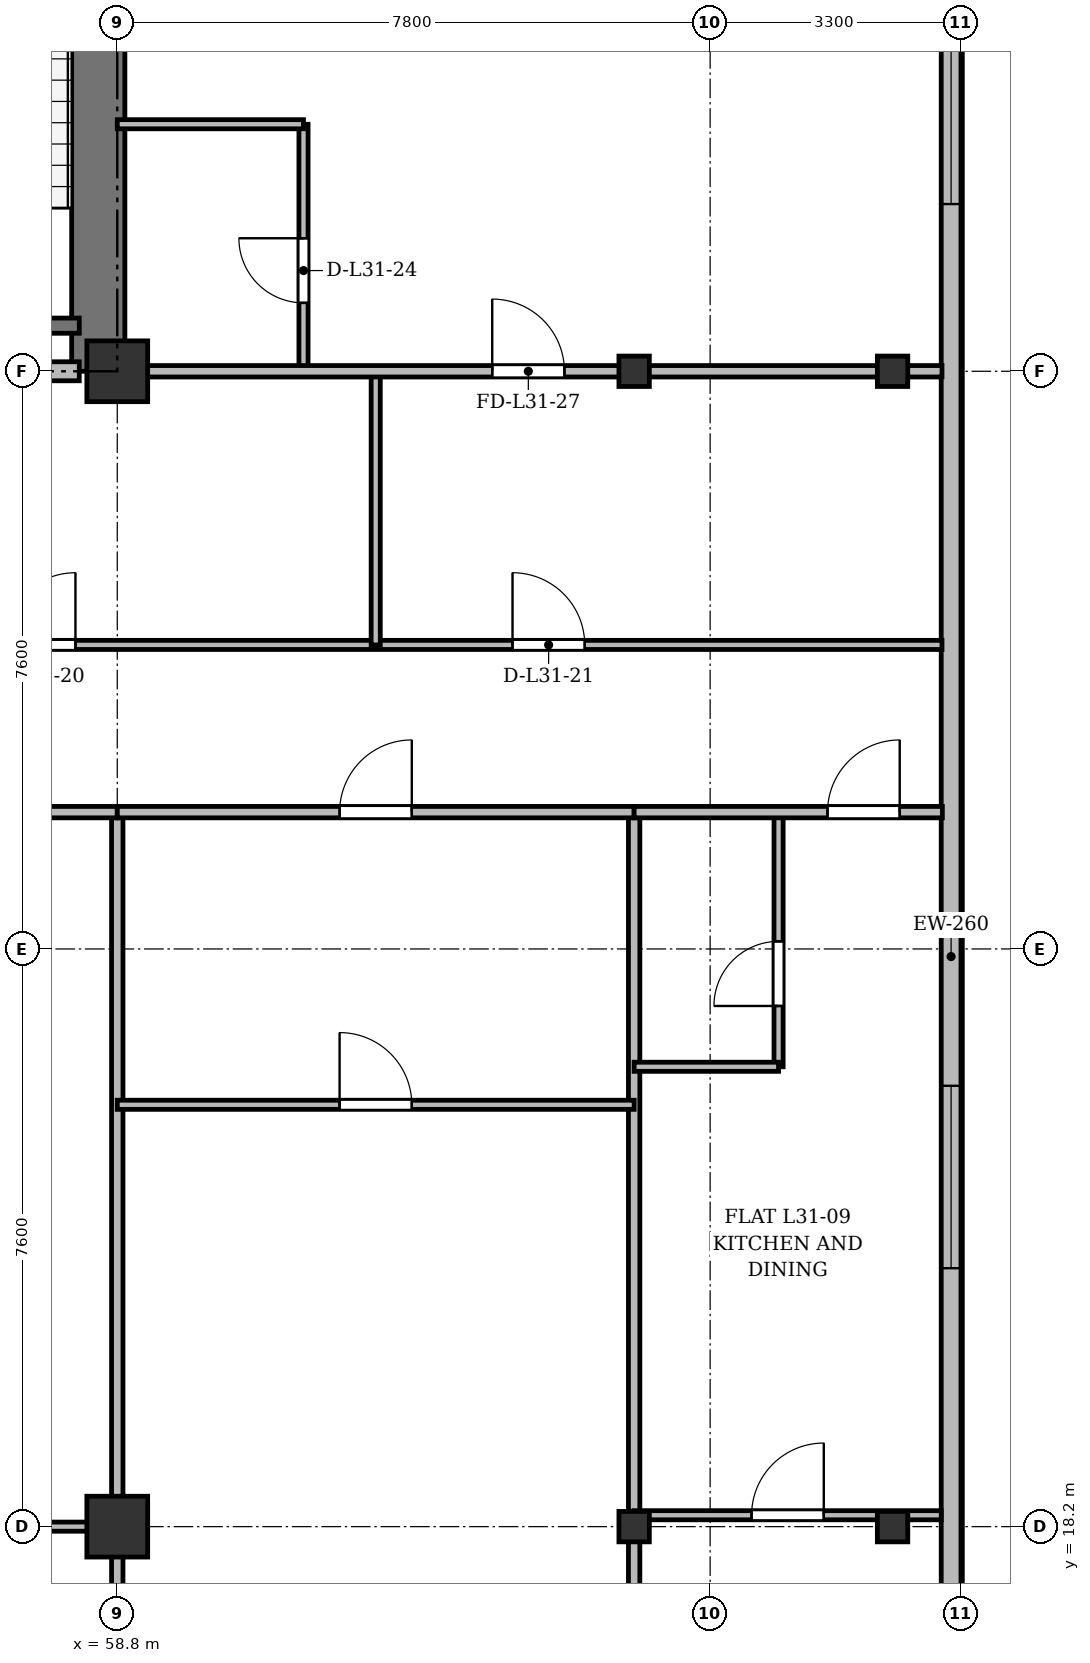
"""IFC4 building model, lengths in metres.
Left out: names, types, materials, properties, quantities, classifications, styles, units other than length and angle.
Written with IfcOpenShell. Run it as: python <this file> out.ifc"""

import sys

from ifc_helpers import new_model, si_unit, direction, frame, frame_2d, origin, origin_2d, place, context, subcontext, project, spatial, rectangle, i_section, extrude, source, transform, mapped, element, fill, save


model = new_model("IFC4")
c1 = context("Model", 3, precision=1e-05, world=origin(), true_north=direction((0.0, 1.0)))
c2 = subcontext(c1, "Body", "Model", "MODEL_VIEW")
j1 = project(units=[si_unit("LENGTHUNIT", "METRE"), si_unit("PLANEANGLEUNIT", "RADIAN")], contexts=[c1])
p1 = place(None, origin())
s1 = spatial("IfcSite", under=j1, at=p1, CompositionType="ELEMENT")
p2 = place(p1, origin())
s2 = spatial("IfcBuilding", under=s1, at=p2, CompositionType="ELEMENT")
p3 = place(p2, frame((0.0, 0.0, 121.3)))
s3 = spatial("IfcBuildingStorey", under=s2, at=p3, CompositionType="ELEMENT", Elevation=121.3)
m1 = source(origin(), c2, "Body", "SweptSolid", [
    extrude(rectangle(XDim=0.8, YDim=0.8, at=origin_2d()), origin(), (0.0, 0.0, 1.0), 3.6),
])
for number, where, z_axis, x_axis in (
    (1, (58.8, 18.2, 0.0), (0.0, 0.0, 1.0), (1.0, 0.0, 0.0)),
    (2, (58.8, 33.4, 0.0), (0.0, 0.0, 1.0), (1.0, 0.0, 0.0)),
):
    element("IfcColumn", number, at=place(p3, frame(where, z_axis=z_axis, x_axis=x_axis)), inside=s3, PredefinedType="COLUMN", context=c2, shape_type="MappedRepresentation", body=[
        mapped(m1, transform((0.0, 0.0, 0.0), x_axis=(1.0, 0.0, 0.0), y_axis=(0.0, 1.0, 0.0), z_axis=(0.0, 0.0, 1.0), scale=1.0)),
    ])
m2 = source(origin(), c2, "Body", "SweptSolid", [
    extrude(i_section(OverallWidth=0.4, OverallDepth=0.4, WebThickness=0.022, FlangeThickness=0.035, at=origin_2d()), origin(), (0.0, 0.0, 1.0), 3.6),
])
for number, where, z_axis, x_axis in (
    (3, (65.6, 18.2, 0.0), (0.0, 0.0, 1.0), (1.0, 0.0, 0.0)),
    (4, (65.6, 33.4, 0.0), (0.0, 0.0, 1.0), (1.0, 0.0, 0.0)),
    (5, (69.0, 18.2, 0.0), (0.0, 0.0, 1.0), (1.0, 0.0, 0.0)),
    (6, (69.0, 33.4, 0.0), (0.0, 0.0, 1.0), (1.0, 0.0, 0.0)),
):
    element("IfcColumn", number, at=place(p3, frame(where, z_axis=z_axis, x_axis=x_axis)), inside=s3, PredefinedType="COLUMN", context=c2, shape_type="MappedRepresentation", body=[
        mapped(m2, transform((0.0, 0.0, 0.0), x_axis=(1.0, 0.0, 0.0), y_axis=(0.0, 1.0, 0.0), z_axis=(0.0, 0.0, 1.0), scale=1.0)),
    ])
p4 = place(p3, frame((69.77, 45.5, 0.0), z_axis=(0.0, 0.0, 1.0), x_axis=(0.0, -1.0, 0.0)))
e7 = element("IfcWall", 7, at=p4, inside=s3, PredefinedType="SOLIDWALL", context=c2, shape_type="SweptSolid", body=[
    extrude(rectangle(XDim=39.6, YDim=0.26, at=frame_2d((19.8, 0.0))), origin(), (0.0, 0.0, 1.0), 3.34),
])
p5 = place(p4, frame((36.95, 0.0, 0.92)))
e8 = element("IfcOpeningElement", 8, at=p5, cuts=e7, PredefinedType="OPENING", context=c2, shape_type="SweptSolid", body=[
    extrude(rectangle(XDim=1.2, YDim=1.65, at=frame_2d((0.6, 0.825))), frame((0.0, 0.14, 0.0), z_axis=(0.0, -1.0, 0.0), x_axis=(1.0, 0.0, 0.0)), (0.0, 0.0, 1.0), 0.28),
])
p6 = place(p4, frame((32.9, 0.0, 0.92)))
e9 = element("IfcOpeningElement", 9, at=p6, cuts=e7, PredefinedType="OPENING", context=c2, shape_type="SweptSolid", body=[
    extrude(rectangle(XDim=2.4, YDim=2.1, at=frame_2d((1.2, 1.05))), frame((0.0, 0.14, 0.0), z_axis=(0.0, -1.0, 0.0), x_axis=(1.0, 0.0, 0.0)), (0.0, 0.0, 1.0), 0.28),
])
p7 = place(p4, frame((28.7, 0.0, 0.92)))
e10 = element("IfcOpeningElement", 10, at=p7, cuts=e7, PredefinedType="OPENING", context=c2, shape_type="SweptSolid", body=[
    extrude(rectangle(XDim=2.4, YDim=2.1, at=frame_2d((1.2, 1.05))), frame((0.0, 0.14, 0.0), z_axis=(0.0, -1.0, 0.0), x_axis=(1.0, 0.0, 0.0)), (0.0, 0.0, 1.0), 0.28),
])
p8 = place(p4, frame((21.5, 0.0, 0.92)))
e11 = element("IfcOpeningElement", 11, at=p8, cuts=e7, PredefinedType="OPENING", context=c2, shape_type="SweptSolid", body=[
    extrude(rectangle(XDim=2.4, YDim=2.1, at=frame_2d((1.2, 1.05))), frame((0.0, 0.14, 0.0), z_axis=(0.0, -1.0, 0.0), x_axis=(1.0, 0.0, 0.0)), (0.0, 0.0, 1.0), 0.28),
])
p9 = place(p4, frame((7.5, 0.0, 0.92)))
e12 = element("IfcOpeningElement", 12, at=p9, cuts=e7, PredefinedType="OPENING", context=c2, shape_type="SweptSolid", body=[
    extrude(rectangle(XDim=2.4, YDim=2.1, at=frame_2d((1.2, 1.05))), frame((0.0, 0.14, 0.0), z_axis=(0.0, -1.0, 0.0), x_axis=(1.0, 0.0, 0.0)), (0.0, 0.0, 1.0), 0.28),
])
p10 = place(p4, frame((4.5, 0.0, 0.92)))
e13 = element("IfcOpeningElement", 13, at=p10, cuts=e7, PredefinedType="OPENING", context=c2, shape_type="SweptSolid", body=[
    extrude(rectangle(XDim=1.2, YDim=1.65, at=frame_2d((0.6, 0.825))), frame((0.0, 0.14, 0.0), z_axis=(0.0, -1.0, 0.0), x_axis=(1.0, 0.0, 0.0)), (0.0, 0.0, 1.0), 0.28),
])
p11 = place(p4, frame((1.15, 0.0, 0.92)))
e14 = element("IfcOpeningElement", 14, at=p11, cuts=e7, PredefinedType="OPENING", context=c2, shape_type="SweptSolid", body=[
    extrude(rectangle(XDim=1.2, YDim=1.65, at=frame_2d((0.6, 0.825))), frame((0.0, 0.14, 0.0), z_axis=(0.0, -1.0, 0.0), x_axis=(1.0, 0.0, 0.0)), (0.0, 0.0, 1.0), 0.28),
])
p12 = place(p3, frame((58.55, 33.4, 0.0), z_axis=(0.0, 0.0, 1.0), x_axis=(0.0, 1.0, 0.0)))
e15 = element("IfcWall", 15, at=p12, inside=s3, PredefinedType="SHEAR", context=c2, shape_type="SweptSolid", body=[
    extrude(rectangle(XDim=11.7, YDim=0.7, at=frame_2d((5.85, 0.0))), origin(), (0.0, 0.0, 1.0), 3.34),
])
p13 = place(p3, frame((54.9, 34.0, 0.0), z_axis=(0.0, 0.0, 1.0), x_axis=(1.0, 0.0, 0.0)))
e16 = element("IfcWall", 16, at=p13, inside=s3, PredefinedType="SHEAR", context=c2, shape_type="SweptSolid", body=[
    extrude(rectangle(XDim=3.4, YDim=0.2, at=frame_2d((1.7, 0.0))), origin(), (0.0, 0.0, 1.0), 3.34),
])
p14 = place(p3, frame((47.15, 33.4, 0.0), z_axis=(0.0, 0.0, 1.0), x_axis=(1.0, 0.0, 0.0)))
e17 = element("IfcWall", 17, at=p14, inside=s3, PredefinedType="PARTITIONING", context=c2, shape_type="SweptSolid", body=[
    extrude(rectangle(XDim=11.15, YDim=0.25, at=frame_2d((5.575, 0.0))), origin(), (0.0, 0.0, 1.0), 2.752),
])
p15 = place(p14, frame((0.7, 0.0, 0.0)))
e18 = element("IfcOpeningElement", 18, at=p15, cuts=e17, PredefinedType="OPENING", context=c2, shape_type="SweptSolid", body=[
    extrude(rectangle(XDim=0.95, YDim=2.15, at=frame_2d((0.475, 1.075))), frame((0.0, 0.135, 0.0), z_axis=(0.0, -1.0, 0.0), x_axis=(1.0, 0.0, 0.0)), (0.0, 0.0, 1.0), 0.27),
])
p16 = place(p14, frame((6.0, 0.0, 0.0)))
e19 = element("IfcOpeningElement", 19, at=p16, cuts=e17, PredefinedType="OPENING", context=c2, shape_type="SweptSolid", body=[
    extrude(rectangle(XDim=1.2, YDim=2.15, at=frame_2d((0.6, 1.075))), frame((0.0, 0.135, 0.0), z_axis=(0.0, -1.0, 0.0), x_axis=(1.0, 0.0, 0.0)), (0.0, 0.0, 1.0), 0.27),
])
p17 = place(p3, frame((54.8, 29.8, 0.0), z_axis=(0.0, 0.0, 1.0), x_axis=(1.0, 0.0, 0.0)))
e20 = element("IfcWall", 20, at=p17, inside=s3, PredefinedType="PARTITIONING", context=c2, shape_type="SweptSolid", body=[
    extrude(rectangle(XDim=14.85, YDim=0.12, at=frame_2d((7.425, 0.0))), origin(), (0.0, 0.0, 1.0), 2.84),
])
p18 = place(p17, frame((2.5, 0.0, 0.0)))
e21 = element("IfcOpeningElement", 21, at=p18, cuts=e20, PredefinedType="OPENING", context=c2, shape_type="SweptSolid", body=[
    extrude(rectangle(XDim=0.95, YDim=2.15, at=frame_2d((0.475, 1.075))), frame((0.0, 0.07, 0.0), z_axis=(0.0, -1.0, 0.0), x_axis=(1.0, 0.0, 0.0)), (0.0, 0.0, 1.0), 0.14),
])
p19 = place(p17, frame((9.2, 0.0, 0.0)))
e22 = element("IfcOpeningElement", 22, at=p19, cuts=e20, PredefinedType="OPENING", context=c2, shape_type="SweptSolid", body=[
    extrude(rectangle(XDim=0.95, YDim=2.15, at=frame_2d((0.475, 1.075))), frame((0.0, 0.07, 0.0), z_axis=(0.0, -1.0, 0.0), x_axis=(1.0, 0.0, 0.0)), (0.0, 0.0, 1.0), 0.14),
])
p20 = place(p3, frame((62.2, 29.8, 0.0), z_axis=(0.0, 0.0, 1.0), x_axis=(0.0, 1.0, 0.0)))
e23 = element("IfcWall", 23, at=p20, inside=s3, PredefinedType="PARTITIONING", context=c2, shape_type="SweptSolid", body=[
    extrude(rectangle(XDim=3.6, YDim=0.12, at=frame_2d((1.8, 0.0))), origin(), (0.0, 0.0, 1.0), 2.752),
])
p21 = place(p3, frame((61.25, 33.4, 0.0), z_axis=(0.0, 0.0, 1.0), x_axis=(0.0, 1.0, 0.0)))
e24 = element("IfcWall", 24, at=p21, inside=s3, PredefinedType="PARTITIONING", context=c2, shape_type="SweptSolid", body=[
    extrude(rectangle(XDim=3.25, YDim=0.12, at=frame_2d((1.625, 0.0))), origin(), (0.0, 0.0, 1.0), 2.752),
])
p22 = place(p21, frame((0.9, 0.0, 0.0)))
e25 = element("IfcOpeningElement", 25, at=p22, cuts=e24, PredefinedType="OPENING", context=c2, shape_type="SweptSolid", body=[
    extrude(rectangle(XDim=0.85, YDim=2.1, at=frame_2d((0.425, 1.05))), frame((0.0, 0.07, 0.0), z_axis=(0.0, -1.0, 0.0), x_axis=(1.0, 0.0, 0.0)), (0.0, 0.0, 1.0), 0.14),
])
p23 = place(p3, frame((58.8, 36.65, 0.0), z_axis=(0.0, 0.0, 1.0), x_axis=(1.0, 0.0, 0.0)))
e26 = element("IfcWall", 26, at=p23, inside=s3, PredefinedType="PARTITIONING", context=c2, shape_type="SweptSolid", body=[
    extrude(rectangle(XDim=2.45, YDim=0.12, at=frame_2d((1.225, 0.0))), origin(), (0.0, 0.0, 1.0), 2.84),
])
p24 = place(p3, frame((58.8, 33.4, 0.0), z_axis=(0.0, 0.0, 1.0), x_axis=(1.0, 0.0, 0.0)))
e27 = element("IfcWall", 27, at=p24, inside=s3, PredefinedType="PARTITIONING", context=c2, shape_type="SweptSolid", body=[
    extrude(rectangle(XDim=10.85, YDim=0.15, at=frame_2d((5.425, 0.0))), origin(), (0.0, 0.0, 1.0), 2.752),
])
p25 = place(p24, frame((4.933, 0.0, 0.0)))
e28 = element("IfcOpeningElement", 28, at=p25, cuts=e27, PredefinedType="OPENING", context=c2, shape_type="SweptSolid", body=[
    extrude(rectangle(XDim=0.95, YDim=2.15, at=frame_2d((0.475, 1.075))), frame((0.0, 0.085, 0.0), z_axis=(0.0, -1.0, 0.0), x_axis=(1.0, 0.0, 0.0)), (0.0, 0.0, 1.0), 0.17),
])
for number, where, z_axis, x_axis in (
    (29, (58.8, 3.145, 0.0), (0.0, 0.0, 1.0), (0.0, 1.0, 0.0)),
    (30, (65.6, 3.145, 0.0), (0.0, 0.0, 1.0), (0.0, 1.0, 0.0)),
):
    element("IfcWall", number, at=place(p3, frame(where, z_axis=z_axis, x_axis=x_axis)), inside=s3, PredefinedType="PARTITIONING", context=c2, shape_type="SweptSolid", body=[
        extrude(rectangle(XDim=24.455, YDim=0.15, at=frame_2d((12.228, 0.0))), origin(), (0.0, 0.0, 1.0), 2.84),
    ])
p26 = place(p3, frame((51.0, 27.6, 0.0), z_axis=(0.0, 0.0, 1.0), x_axis=(1.0, 0.0, 0.0)))
e31 = element("IfcWall", 31, at=p26, inside=s3, PredefinedType="PARTITIONING", context=c2, shape_type="SweptSolid", body=[
    extrude(rectangle(XDim=7.8, YDim=0.15, at=frame_2d((3.9, 0.0))), origin(), (0.0, 0.0, 1.0), 2.84),
])
p27 = place(p26, frame((3.333, 0.0, 0.0)))
e32 = element("IfcOpeningElement", 32, at=p27, cuts=e31, PredefinedType="OPENING", context=c2, shape_type="SweptSolid", body=[
    extrude(rectangle(XDim=0.95, YDim=2.15, at=frame_2d((0.475, 1.075))), frame((0.0, 0.085, 0.0), z_axis=(0.0, -1.0, 0.0), x_axis=(1.0, 0.0, 0.0)), (0.0, 0.0, 1.0), 0.17),
])
p28 = place(p3, frame((51.0, 18.2, 0.0), z_axis=(0.0, 0.0, 1.0), x_axis=(1.0, 0.0, 0.0)))
e33 = element("IfcWall", 33, at=p28, inside=s3, PredefinedType="PARTITIONING", context=c2, shape_type="SweptSolid", body=[
    extrude(rectangle(XDim=7.8, YDim=0.12, at=frame_2d((3.9, 0.0))), origin(), (0.0, 0.0, 1.0), 2.752),
])
p29 = place(p28, frame((3.333, 0.0, 0.0)))
e34 = element("IfcOpeningElement", 34, at=p29, cuts=e33, PredefinedType="OPENING", context=c2, shape_type="SweptSolid", body=[
    extrude(rectangle(XDim=0.95, YDim=2.15, at=frame_2d((0.475, 1.075))), frame((0.0, 0.07, 0.0), z_axis=(0.0, -1.0, 0.0), x_axis=(1.0, 0.0, 0.0)), (0.0, 0.0, 1.0), 0.14),
])
p30 = place(p3, frame((58.8, 27.6, 0.0), z_axis=(0.0, 0.0, 1.0), x_axis=(1.0, 0.0, 0.0)))
e35 = element("IfcWall", 35, at=p30, inside=s3, PredefinedType="PARTITIONING", context=c2, shape_type="SweptSolid", body=[
    extrude(rectangle(XDim=6.8, YDim=0.15, at=frame_2d((3.4, 0.0))), origin(), (0.0, 0.0, 1.0), 2.84),
])
p31 = place(p30, frame((2.925, 0.0, 0.0)))
e36 = element("IfcOpeningElement", 36, at=p31, cuts=e35, PredefinedType="OPENING", context=c2, shape_type="SweptSolid", body=[
    extrude(rectangle(XDim=0.95, YDim=2.15, at=frame_2d((0.475, 1.075))), frame((0.0, 0.085, 0.0), z_axis=(0.0, -1.0, 0.0), x_axis=(1.0, 0.0, 0.0)), (0.0, 0.0, 1.0), 0.17),
])
p32 = place(p3, frame((58.8, 23.75, 0.0), z_axis=(0.0, 0.0, 1.0), x_axis=(1.0, 0.0, 0.0)))
e37 = element("IfcWall", 37, at=p32, inside=s3, PredefinedType="PARTITIONING", context=c2, shape_type="SweptSolid", body=[
    extrude(rectangle(XDim=6.8, YDim=0.12, at=frame_2d((3.4, 0.0))), origin(), (0.0, 0.0, 1.0), 2.84),
])
p33 = place(p32, frame((2.925, 0.0, 0.0)))
e38 = element("IfcOpeningElement", 38, at=p33, cuts=e37, PredefinedType="OPENING", context=c2, shape_type="SweptSolid", body=[
    extrude(rectangle(XDim=0.95, YDim=2.15, at=frame_2d((0.475, 1.075))), frame((0.0, 0.07, 0.0), z_axis=(0.0, -1.0, 0.0), x_axis=(1.0, 0.0, 0.0)), (0.0, 0.0, 1.0), 0.14),
])
p34 = place(p3, frame((65.6, 18.35, 0.0), z_axis=(0.0, 0.0, 1.0), x_axis=(1.0, 0.0, 0.0)))
e39 = element("IfcWall", 39, at=p34, inside=s3, PredefinedType="PARTITIONING", context=c2, shape_type="SweptSolid", body=[
    extrude(rectangle(XDim=4.04, YDim=0.12, at=frame_2d((2.02, 0.0))), origin(), (0.0, 0.0, 1.0), 2.752),
])
p35 = place(p34, frame((1.545, 0.0, 0.0)))
e40 = element("IfcOpeningElement", 40, at=p35, cuts=e39, PredefinedType="OPENING", context=c2, shape_type="SweptSolid", body=[
    extrude(rectangle(XDim=0.95, YDim=2.15, at=frame_2d((0.475, 1.075))), frame((0.0, 0.07, 0.0), z_axis=(0.0, -1.0, 0.0), x_axis=(1.0, 0.0, 0.0)), (0.0, 0.0, 1.0), 0.14),
])
p36 = place(p3, frame((67.5, 24.25, 0.0), z_axis=(0.0, 0.0, 1.0), x_axis=(0.0, 1.0, 0.0)))
e41 = element("IfcWall", 41, at=p36, inside=s3, PredefinedType="PARTITIONING", context=c2, shape_type="SweptSolid", body=[
    extrude(rectangle(XDim=3.35, YDim=0.12, at=frame_2d((1.675, 0.0))), origin(), (0.0, 0.0, 1.0), 2.99),
])
p37 = place(p36, frame((0.8, 0.0, 0.0)))
e42 = element("IfcOpeningElement", 42, at=p37, cuts=e41, PredefinedType="OPENING", context=c2, shape_type="SweptSolid", body=[
    extrude(rectangle(XDim=0.85, YDim=2.1, at=frame_2d((0.425, 1.05))), frame((0.0, 0.07, 0.0), z_axis=(0.0, -1.0, 0.0), x_axis=(1.0, 0.0, 0.0)), (0.0, 0.0, 1.0), 0.14),
])
p38 = place(p3, frame((65.6, 24.25, 0.0), z_axis=(0.0, 0.0, 1.0), x_axis=(1.0, 0.0, 0.0)))
e43 = element("IfcWall", 43, at=p38, inside=s3, PredefinedType="PARTITIONING", context=c2, shape_type="SweptSolid", body=[
    extrude(rectangle(XDim=1.9, YDim=0.12, at=frame_2d((0.95, 0.0))), origin(), (0.0, 0.0, 1.0), 2.84),
])
p39 = place(p3, frame((65.6, 27.6, 0.0), z_axis=(0.0, 0.0, 1.0), x_axis=(1.0, 0.0, 0.0)))
e44 = element("IfcWall", 44, at=p39, inside=s3, PredefinedType="PARTITIONING", context=c2, shape_type="SweptSolid", body=[
    extrude(rectangle(XDim=4.055, YDim=0.15, at=frame_2d((2.027, 0.0))), origin(), (0.0, 0.0, 1.0), 2.84),
])
p40 = place(p39, frame((2.544, 0.0, 0.0)))
e45 = element("IfcOpeningElement", 45, at=p40, cuts=e44, PredefinedType="OPENING", context=c2, shape_type="SweptSolid", body=[
    extrude(rectangle(XDim=0.95, YDim=2.15, at=frame_2d((0.475, 1.075))), frame((0.0, 0.085, 0.0), z_axis=(0.0, -1.0, 0.0), x_axis=(1.0, 0.0, 0.0)), (0.0, 0.0, 1.0), 0.17),
])
m3 = source(origin(), c2, "Body", "SweptSolid", [
    extrude(rectangle(XDim=2.4, YDim=2.1, at=frame_2d((1.2, 1.05))), frame((0.0, 0.03, 0.0), z_axis=(0.0, -1.0, 0.0), x_axis=(1.0, 0.0, 0.0)), (0.0, 0.0, 1.0), 0.06),
])
p41 = place(p8, origin())
e46 = element("IfcWindow", 46, at=p41, inside=s3, PartitioningType="SINGLE_PANEL", PredefinedType="WINDOW", context=c2, shape_type="MappedRepresentation", body=[
    mapped(m3, transform((0.0, 0.0, 0.0), x_axis=(1.0, 0.0, 0.0), y_axis=(0.0, 1.0, 0.0), z_axis=(0.0, 0.0, 1.0), scale=1.0)),
])
fill(e11, e46)
p42 = place(p9, origin())
e47 = element("IfcWindow", 47, at=p42, inside=s3, PartitioningType="SINGLE_PANEL", PredefinedType="WINDOW", context=c2, shape_type="MappedRepresentation", body=[
    mapped(m3, transform((0.0, 0.0, 0.0), x_axis=(1.0, 0.0, 0.0), y_axis=(0.0, 1.0, 0.0), z_axis=(0.0, 0.0, 1.0), scale=1.0)),
])
fill(e12, e47)
m4 = source(origin(), c2, "Body", "SweptSolid", [
    extrude(rectangle(XDim=0.95, YDim=2.15, at=frame_2d((0.475, 1.075))), frame((0.0, 0.025, 0.0), z_axis=(0.0, -1.0, 0.0), x_axis=(1.0, 0.0, 0.0)), (0.0, 0.0, 1.0), 0.05),
])
p43 = place(p18, origin())
e48 = element("IfcDoor", 48, at=p43, inside=s3, OperationType="SINGLE_SWING_RIGHT", PredefinedType="DOOR", context=c2, shape_type="MappedRepresentation", body=[
    mapped(m4, transform((0.0, 0.0, 0.0), x_axis=(1.0, 0.0, 0.0), y_axis=(0.0, 1.0, 0.0), z_axis=(0.0, 0.0, 1.0), scale=1.0)),
])
fill(e21, e48)
p44 = place(p19, origin())
e49 = element("IfcDoor", 49, at=p44, inside=s3, OperationType="SINGLE_SWING_LEFT", PredefinedType="DOOR", context=c2, shape_type="MappedRepresentation", body=[
    mapped(m4, transform((0.0, 0.0, 0.0), x_axis=(1.0, 0.0, 0.0), y_axis=(0.0, 1.0, 0.0), z_axis=(0.0, 0.0, 1.0), scale=1.0)),
])
fill(e22, e49)
m5 = source(origin(), c2, "Body", "SweptSolid", [
    extrude(rectangle(XDim=0.85, YDim=2.1, at=frame_2d((0.425, 1.05))), frame((0.0, 0.025, 0.0), z_axis=(0.0, -1.0, 0.0), x_axis=(1.0, 0.0, 0.0)), (0.0, 0.0, 1.0), 0.05),
])
p45 = place(p22, origin())
e50 = element("IfcDoor", 50, at=p45, inside=s3, OperationType="SINGLE_SWING_RIGHT", PredefinedType="DOOR", context=c2, shape_type="MappedRepresentation", body=[
    mapped(m5, transform((0.0, 0.0, 0.0), x_axis=(1.0, 0.0, 0.0), y_axis=(0.0, 1.0, 0.0), z_axis=(0.0, 0.0, 1.0), scale=1.0)),
])
fill(e25, e50)
p46 = place(p25, origin())
e51 = element("IfcDoor", 51, at=p46, inside=s3, OperationType="SINGLE_SWING_LEFT", PredefinedType="DOOR", context=c2, shape_type="MappedRepresentation", body=[
    mapped(m4, transform((0.0, 0.0, 0.0), x_axis=(1.0, 0.0, 0.0), y_axis=(0.0, 1.0, 0.0), z_axis=(0.0, 0.0, 1.0), scale=1.0)),
])
fill(e28, e51)
p47 = place(p31, origin())
e52 = element("IfcDoor", 52, at=p47, inside=s3, OperationType="SINGLE_SWING_RIGHT", PredefinedType="DOOR", context=c2, shape_type="MappedRepresentation", body=[
    mapped(m4, transform((0.0, 0.0, 0.0), x_axis=(1.0, 0.0, 0.0), y_axis=(0.0, 1.0, 0.0), z_axis=(0.0, 0.0, 1.0), scale=1.0)),
])
fill(e36, e52)
p48 = place(p33, origin())
e53 = element("IfcDoor", 53, at=p48, inside=s3, OperationType="SINGLE_SWING_LEFT", PredefinedType="DOOR", context=c2, shape_type="MappedRepresentation", body=[
    mapped(m4, transform((0.0, 0.0, 0.0), x_axis=(1.0, 0.0, 0.0), y_axis=(0.0, 1.0, 0.0), z_axis=(0.0, 0.0, 1.0), scale=1.0)),
])
fill(e38, e53)
p49 = place(p35, origin())
e54 = element("IfcDoor", 54, at=p49, inside=s3, OperationType="SINGLE_SWING_RIGHT", PredefinedType="DOOR", context=c2, shape_type="MappedRepresentation", body=[
    mapped(m4, transform((0.0, 0.0, 0.0), x_axis=(1.0, 0.0, 0.0), y_axis=(0.0, 1.0, 0.0), z_axis=(0.0, 0.0, 1.0), scale=1.0)),
])
fill(e40, e54)
p50 = place(p37, origin())
e55 = element("IfcDoor", 55, at=p50, inside=s3, OperationType="SINGLE_SWING_LEFT", PredefinedType="DOOR", context=c2, shape_type="MappedRepresentation", body=[
    mapped(m5, transform((0.0, 0.0, 0.0), x_axis=(1.0, 0.0, 0.0), y_axis=(0.0, 1.0, 0.0), z_axis=(0.0, 0.0, 1.0), scale=1.0)),
])
fill(e42, e55)
p51 = place(p40, origin())
e56 = element("IfcDoor", 56, at=p51, inside=s3, OperationType="SINGLE_SWING_RIGHT", PredefinedType="DOOR", context=c2, shape_type="MappedRepresentation", body=[
    mapped(m4, transform((0.0, 0.0, 0.0), x_axis=(1.0, 0.0, 0.0), y_axis=(0.0, 1.0, 0.0), z_axis=(0.0, 0.0, 1.0), scale=1.0)),
])
fill(e45, e56)
save(model, sys.argv[1])
